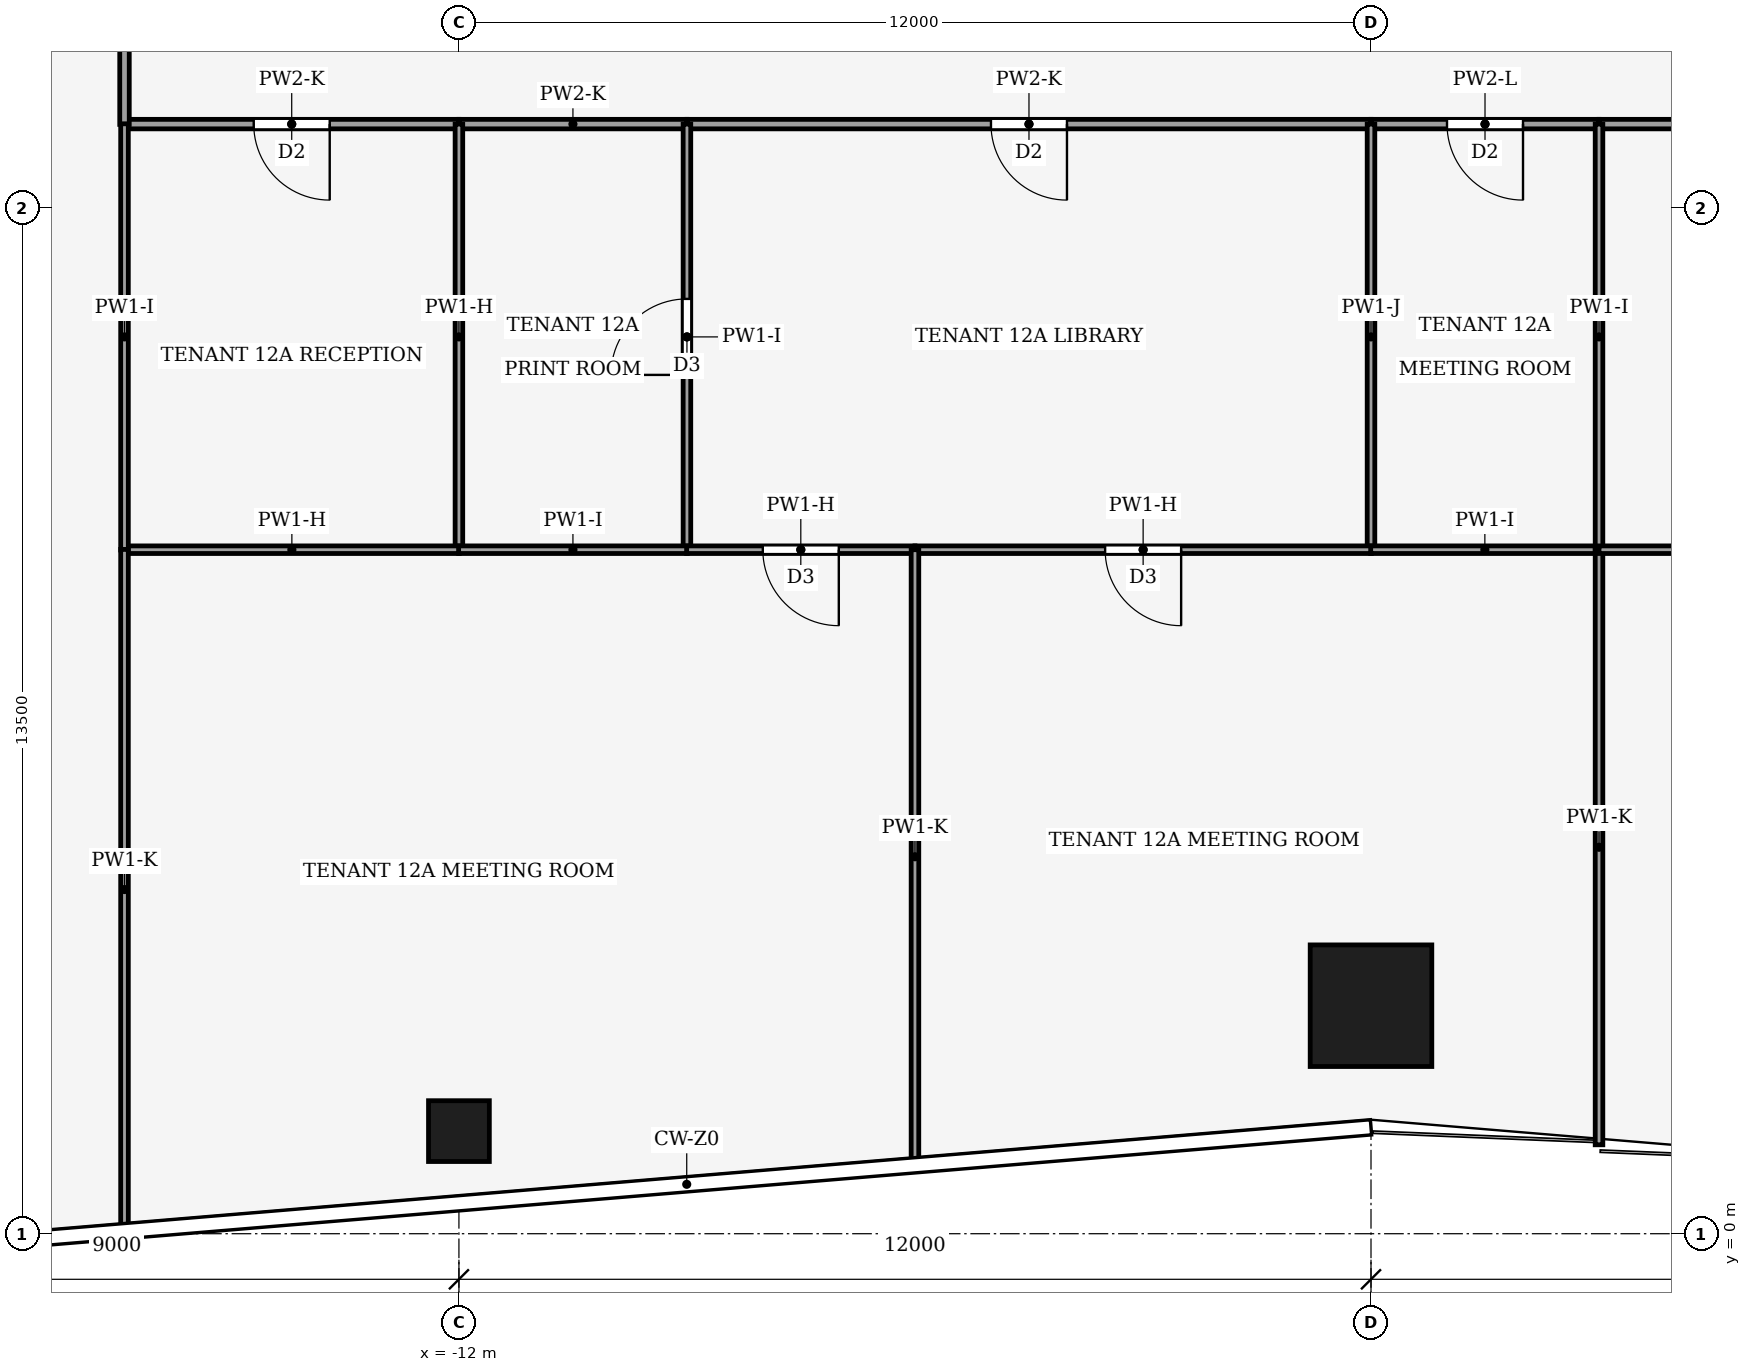
"""IFC4 building model, lengths in metres.
Left out: names, types, materials, properties, quantities, classifications, styles, units other than length and angle.
Written with IfcOpenShell. Run it as: python <this file> out.ifc"""

import sys

from ifc_helpers import new_model, si_unit, direction, frame, frame_2d, origin, origin_2d, place, context, subcontext, project, spatial, rectangle, hollow_rectangle, extrude, element, fill, save


model = new_model("IFC4")
c1 = context("Model", 3, precision=1e-05, world=origin(), true_north=direction((0.0, 1.0)))
c2 = subcontext(c1, "Body", "Model", "MODEL_VIEW")
j1 = project(units=[si_unit("LENGTHUNIT", "METRE"), si_unit("PLANEANGLEUNIT", "RADIAN")], contexts=[c1])
p1 = place(None, origin())
s1 = spatial("IfcSite", under=j1, at=p1, CompositionType="ELEMENT")
p2 = place(p1, origin())
s2 = spatial("IfcBuilding", under=s1, at=p2, CompositionType="ELEMENT")
p3 = place(p2, frame((0.0, 0.0, 54.0)))
s3 = spatial("IfcBuildingStorey", under=s2, at=p3, CompositionType="ELEMENT", Elevation=54.0)
p4 = place(p3, frame((0.0, 3.0, 0.0), z_axis=(0.0, 0.0, 1.0), x_axis=(1.0, 0.0, 0.0)))
e1 = element("IfcColumn", 1, at=p4, inside=s3, PredefinedType="COLUMN", context=c2, shape_type="SweptSolid", body=[
    extrude(hollow_rectangle(XDim=1.6, YDim=1.6, WallThickness=0.09, at=origin_2d()), origin(), (0.0, 0.0, 1.0), 4.0),
])
p5 = place(p3, frame((-12.0, 1.35, 0.0), z_axis=(0.0, 0.0, 1.0), x_axis=(1.0, 0.0, 0.0)))
e2 = element("IfcColumn", 2, at=p5, inside=s3, PredefinedType="COLUMN", context=c2, shape_type="SweptSolid", body=[
    extrude(hollow_rectangle(XDim=0.8, YDim=0.8, WallThickness=0.04, at=origin_2d()), origin(), (0.0, 0.0, 1.0), 4.0),
])
p6 = place(p3, frame((-12.0, 14.6, 0.0), z_axis=(0.0, 0.0, 1.0), x_axis=(-1.0, 0.0, 0.0)))
e3 = element("IfcWall", 3, at=p6, inside=s3, PredefinedType="PARTITIONING", context=c2, shape_type="SweptSolid", body=[
    extrude(rectangle(XDim=4.4, YDim=0.125, at=frame_2d((2.2, 0.0))), origin(), (0.0, 0.0, 1.0), 3.17),
])
p7 = place(p6, frame((1.7, 0.0, 0.0)))
e4 = element("IfcOpeningElement", 4, at=p7, cuts=e3, PredefinedType="OPENING", context=c2, shape_type="SweptSolid", body=[
    extrude(rectangle(XDim=1.0, YDim=2.1, at=frame_2d((0.5, 1.05))), frame((0.0, 0.073, 0.0), z_axis=(0.0, -1.0, 0.0), x_axis=(1.0, 0.0, 0.0)), (0.0, 0.0, 1.0), 0.145),
])
p8 = place(p3, frame((-12.0, 14.6, 0.0), z_axis=(0.0, 0.0, 1.0), x_axis=(1.0, 0.0, 0.0)))
e5 = element("IfcWall", 5, at=p8, inside=s3, PredefinedType="PARTITIONING", context=c2, shape_type="SweptSolid", body=[
    extrude(rectangle(XDim=3.0, YDim=0.125, at=frame_2d((1.5, 0.0))), origin(), (0.0, 0.0, 1.0), 3.17),
])
p9 = place(p3, frame((0.0, 14.6, 0.0), z_axis=(0.0, 0.0, 1.0), x_axis=(-1.0, 0.0, 0.0)))
e6 = element("IfcWall", 6, at=p9, inside=s3, PredefinedType="PARTITIONING", context=c2, shape_type="SweptSolid", body=[
    extrude(rectangle(XDim=9.0, YDim=0.125, at=frame_2d((4.5, 0.0))), origin(), (0.0, 0.0, 1.0), 3.17),
])
p10 = place(p9, frame((4.0, 0.0, 0.0)))
e7 = element("IfcOpeningElement", 7, at=p10, cuts=e6, PredefinedType="OPENING", context=c2, shape_type="SweptSolid", body=[
    extrude(rectangle(XDim=1.0, YDim=2.1, at=frame_2d((0.5, 1.05))), frame((0.0, 0.073, 0.0), z_axis=(0.0, -1.0, 0.0), x_axis=(1.0, 0.0, 0.0)), (0.0, 0.0, 1.0), 0.145),
])
p11 = place(p3, frame((3.0, 14.6, 0.0), z_axis=(0.0, 0.0, 1.0), x_axis=(-1.0, 0.0, 0.0)))
e8 = element("IfcWall", 8, at=p11, inside=s3, PredefinedType="PARTITIONING", context=c2, shape_type="SweptSolid", body=[
    extrude(rectangle(XDim=3.0, YDim=0.125, at=frame_2d((1.5, 0.0))), origin(), (0.0, 0.0, 1.0), 3.22),
])
p12 = place(p11, frame((1.0, 0.0, 0.0)))
e9 = element("IfcOpeningElement", 9, at=p12, cuts=e8, PredefinedType="OPENING", context=c2, shape_type="SweptSolid", body=[
    extrude(rectangle(XDim=1.0, YDim=2.1, at=frame_2d((0.5, 1.05))), frame((0.0, 0.073, 0.0), z_axis=(0.0, -1.0, 0.0), x_axis=(1.0, 0.0, 0.0)), (0.0, 0.0, 1.0), 0.145),
])
p13 = place(p3, frame((9.0, 14.6, 0.0), z_axis=(0.0, 0.0, 1.0), x_axis=(-1.0, 0.0, 0.0)))
e10 = element("IfcWall", 10, at=p13, inside=s3, PredefinedType="PARTITIONING", context=c2, shape_type="SweptSolid", body=[
    extrude(rectangle(XDim=6.0, YDim=0.125, at=frame_2d((3.0, 0.0))), origin(), (0.0, 0.0, 1.0), 3.17),
])
p14 = place(p13, frame((2.5, 0.0, 0.0)))
e11 = element("IfcOpeningElement", 11, at=p14, cuts=e10, PredefinedType="OPENING", context=c2, shape_type="SweptSolid", body=[
    extrude(rectangle(XDim=1.0, YDim=2.1, at=frame_2d((0.5, 1.05))), frame((0.0, 0.073, 0.0), z_axis=(0.0, -1.0, 0.0), x_axis=(1.0, 0.0, 0.0)), (0.0, 0.0, 1.0), 0.145),
])
p15 = place(p3, frame((-16.4, 14.596, 0.0), z_axis=(0.0, 0.0, 1.0), x_axis=(0.0, 1.0, 0.0)))
e12 = element("IfcWall", 12, at=p15, inside=s3, PredefinedType="PARTITIONING", context=c2, shape_type="SweptSolid", body=[
    extrude(rectangle(XDim=3.404, YDim=0.125, at=frame_2d((1.702, 0.0))), origin(), (0.0, 0.0, 1.0), 3.02),
])
p16 = place(p15, frame((1.602, 0.0, 0.0)))
e13 = element("IfcOpeningElement", 13, at=p16, cuts=e12, PredefinedType="OPENING", context=c2, shape_type="SweptSolid", body=[
    extrude(rectangle(XDim=1.0, YDim=2.1, at=frame_2d((0.5, 1.05))), frame((0.0, 0.073, 0.0), z_axis=(0.0, -1.0, 0.0), x_axis=(1.0, 0.0, 0.0)), (0.0, 0.0, 1.0), 0.145),
])
p17 = place(p3, frame((-12.0, 9.0, 0.0), z_axis=(0.0, 0.0, 1.0), x_axis=(0.0, 1.0, 0.0)))
e14 = element("IfcWall", 14, at=p17, inside=s3, PredefinedType="PARTITIONING", context=c2, shape_type="SweptSolid", body=[
    extrude(rectangle(XDim=5.6, YDim=0.1, at=frame_2d((2.8, 0.0))), origin(), (0.0, 0.0, 1.0), 3.17),
])
p18 = place(p3, frame((-16.4, 9.0, 0.0), z_axis=(0.0, 0.0, 1.0), x_axis=(1.0, 0.0, 0.0)))
e15 = element("IfcWall", 15, at=p18, inside=s3, PredefinedType="PARTITIONING", context=c2, shape_type="SweptSolid", body=[
    extrude(rectangle(XDim=4.404, YDim=0.1, at=frame_2d((2.202, 0.0))), origin(), (0.0, 0.0, 1.0), 3.17),
])
p19 = place(p3, frame((-16.4, 14.604, 0.0), z_axis=(0.0, 0.0, 1.0), x_axis=(0.0, -1.0, 0.0)))
e16 = element("IfcWall", 16, at=p19, inside=s3, PredefinedType="PARTITIONING", context=c2, shape_type="SweptSolid", body=[
    extrude(rectangle(XDim=5.608, YDim=0.1, at=frame_2d((2.804, 0.0))), origin(), (0.0, 0.0, 1.0), 3.75),
])
p20 = place(p3, frame((-9.0, 9.0, 0.0), z_axis=(0.0, 0.0, 1.0), x_axis=(0.0, 1.0, 0.0)))
e17 = element("IfcWall", 17, at=p20, inside=s3, PredefinedType="PARTITIONING", context=c2, shape_type="SweptSolid", body=[
    extrude(rectangle(XDim=5.6, YDim=0.1, at=frame_2d((2.8, 0.0))), origin(), (0.0, 0.0, 1.0), 3.75),
])
p21 = place(p20, frame((2.3, 0.0, 0.0)))
e18 = element("IfcOpeningElement", 18, at=p21, cuts=e17, PredefinedType="OPENING", context=c2, shape_type="SweptSolid", body=[
    extrude(rectangle(XDim=1.0, YDim=2.1, at=frame_2d((0.5, 1.05))), frame((0.0, 0.06, 0.0), z_axis=(0.0, -1.0, 0.0), x_axis=(1.0, 0.0, 0.0)), (0.0, 0.0, 1.0), 0.12),
])
p22 = place(p3, frame((-12.004, 9.0, 0.0), z_axis=(0.0, 0.0, 1.0), x_axis=(1.0, 0.0, 0.0)))
e19 = element("IfcWall", 19, at=p22, inside=s3, PredefinedType="PARTITIONING", context=c2, shape_type="SweptSolid", body=[
    extrude(rectangle(XDim=3.008, YDim=0.1, at=frame_2d((1.504, 0.0))), origin(), (0.0, 0.0, 1.0), 3.75),
])
p23 = place(p3, frame((0.0, 9.0, 0.0), z_axis=(0.0, 0.0, 1.0), x_axis=(0.0, 1.0, 0.0)))
e20 = element("IfcWall", 20, at=p23, inside=s3, PredefinedType="PARTITIONING", context=c2, shape_type="SweptSolid", body=[
    extrude(rectangle(XDim=5.6, YDim=0.1, at=frame_2d((2.8, 0.0))), origin(), (0.0, 0.0, 1.0), 3.22),
])
p24 = place(p3, frame((-6.0, 9.0, 0.0), z_axis=(0.0, 0.0, 1.0), x_axis=(-1.0, 0.0, 0.0)))
e21 = element("IfcWall", 21, at=p24, inside=s3, PredefinedType="PARTITIONING", context=c2, shape_type="SweptSolid", body=[
    extrude(rectangle(XDim=3.004, YDim=0.1, at=frame_2d((1.502, 0.0))), origin(), (0.0, 0.0, 1.0), 3.17),
])
p25 = place(p24, frame((1.002, 0.0, 0.0)))
e22 = element("IfcOpeningElement", 22, at=p25, cuts=e21, PredefinedType="OPENING", context=c2, shape_type="SweptSolid", body=[
    extrude(rectangle(XDim=1.0, YDim=2.1, at=frame_2d((0.5, 1.05))), frame((0.0, 0.06, 0.0), z_axis=(0.0, -1.0, 0.0), x_axis=(1.0, 0.0, 0.0)), (0.0, 0.0, 1.0), 0.12),
])
p26 = place(p3, frame((0.004, 9.0, 0.0), z_axis=(0.0, 0.0, 1.0), x_axis=(-1.0, 0.0, 0.0)))
e23 = element("IfcWall", 23, at=p26, inside=s3, PredefinedType="PARTITIONING", context=c2, shape_type="SweptSolid", body=[
    extrude(rectangle(XDim=6.004, YDim=0.1, at=frame_2d((3.002, 0.0))), origin(), (0.0, 0.0, 1.0), 3.17),
])
p27 = place(p26, frame((2.502, 0.0, 0.0)))
e24 = element("IfcOpeningElement", 24, at=p27, cuts=e23, PredefinedType="OPENING", context=c2, shape_type="SweptSolid", body=[
    extrude(rectangle(XDim=1.0, YDim=2.1, at=frame_2d((0.5, 1.05))), frame((0.0, 0.06, 0.0), z_axis=(0.0, -1.0, 0.0), x_axis=(1.0, 0.0, 0.0)), (0.0, 0.0, 1.0), 0.12),
])
p28 = place(p3, frame((-0.004, 9.0, 0.0), z_axis=(0.0, 0.0, 1.0), x_axis=(1.0, 0.0, 0.0)))
e25 = element("IfcWall", 25, at=p28, inside=s3, PredefinedType="PARTITIONING", context=c2, shape_type="SweptSolid", body=[
    extrude(rectangle(XDim=3.004, YDim=0.1, at=frame_2d((1.502, 0.0))), origin(), (0.0, 0.0, 1.0), 3.75),
])
p29 = place(p3, frame((3.0, 9.0, 0.0), z_axis=(0.0, 0.0, 1.0), x_axis=(0.0, 1.0, 0.0)))
e26 = element("IfcWall", 26, at=p29, inside=s3, PredefinedType="PARTITIONING", context=c2, shape_type="SweptSolid", body=[
    extrude(rectangle(XDim=5.6, YDim=0.1, at=frame_2d((2.8, 0.0))), origin(), (0.0, 0.0, 1.0), 3.75),
])
p30 = place(p3, frame((-6.0, 0.92, 0.0), z_axis=(0.0, 0.0, 1.0), x_axis=(0.0, 1.0, 0.0)))
e27 = element("IfcWall", 27, at=p30, inside=s3, PredefinedType="PARTITIONING", context=c2, shape_type="SweptSolid", body=[
    extrude(rectangle(XDim=8.08, YDim=0.1, at=frame_2d((4.04, 0.0))), origin(), (0.0, 0.0, 1.0), 2.92),
])
p31 = place(p3, frame((-16.4, 9.004, 0.0), z_axis=(0.0, 0.0, 1.0), x_axis=(0.0, -1.0, 0.0)))
e28 = element("IfcWall", 28, at=p31, inside=s3, PredefinedType="PARTITIONING", context=c2, shape_type="SweptSolid", body=[
    extrude(rectangle(XDim=8.951, YDim=0.1, at=frame_2d((4.475, 0.0))), origin(), (0.0, 0.0, 1.0), 2.92),
])
p32 = place(p3, frame((3.0, 1.17, 0.0), z_axis=(0.0, 0.0, 1.0), x_axis=(0.0, 1.0, 0.0)))
e29 = element("IfcWall", 29, at=p32, inside=s3, PredefinedType="PARTITIONING", context=c2, shape_type="SweptSolid", body=[
    extrude(rectangle(XDim=7.83, YDim=0.1, at=frame_2d((3.915, 0.0))), origin(), (0.0, 0.0, 1.0), 2.92),
])
p33 = place(p3, frame((9.004, 9.0, 0.0), z_axis=(0.0, 0.0, 1.0), x_axis=(-1.0, 0.0, 0.0)))
e30 = element("IfcWall", 30, at=p33, inside=s3, PredefinedType="PARTITIONING", context=c2, shape_type="SweptSolid", body=[
    extrude(rectangle(XDim=6.004, YDim=0.1, at=frame_2d((3.002, 0.0))), origin(), (0.0, 0.0, 1.0), 3.17),
])
p34 = place(p33, frame((2.502, 0.0, 0.0)))
e31 = element("IfcOpeningElement", 31, at=p34, cuts=e30, PredefinedType="OPENING", context=c2, shape_type="SweptSolid", body=[
    extrude(rectangle(XDim=1.0, YDim=2.1, at=frame_2d((0.5, 1.05))), frame((0.0, 0.06, 0.0), z_axis=(0.0, -1.0, 0.0), x_axis=(1.0, 0.0, 0.0)), (0.0, 0.0, 1.0), 0.12),
])
p35 = place(p7, origin())
e32 = element("IfcDoor", 32, at=p35, inside=s3, OperationType="SINGLE_SWING_LEFT", PredefinedType="DOOR", context=c2, shape_type="SweptSolid", body=[
    extrude(rectangle(XDim=1.0, YDim=2.1, at=frame_2d((0.5, 1.05))), frame((0.0, 0.025, 0.0), z_axis=(0.0, -1.0, 0.0), x_axis=(1.0, 0.0, 0.0)), (0.0, 0.0, 1.0), 0.05),
])
fill(e4, e32)
p36 = place(p10, origin())
e33 = element("IfcDoor", 33, at=p36, inside=s3, OperationType="SINGLE_SWING_RIGHT", PredefinedType="DOOR", context=c2, shape_type="SweptSolid", body=[
    extrude(rectangle(XDim=1.0, YDim=2.1, at=frame_2d((0.5, 1.05))), frame((0.0, 0.025, 0.0), z_axis=(0.0, -1.0, 0.0), x_axis=(1.0, 0.0, 0.0)), (0.0, 0.0, 1.0), 0.05),
])
fill(e7, e33)
p37 = place(p12, origin())
e34 = element("IfcDoor", 34, at=p37, inside=s3, OperationType="SINGLE_SWING_LEFT", PredefinedType="DOOR", context=c2, shape_type="SweptSolid", body=[
    extrude(rectangle(XDim=1.0, YDim=2.1, at=frame_2d((0.5, 1.05))), frame((0.0, 0.025, 0.0), z_axis=(0.0, -1.0, 0.0), x_axis=(1.0, 0.0, 0.0)), (0.0, 0.0, 1.0), 0.05),
])
fill(e9, e34)
p38 = place(p21, origin())
e35 = element("IfcDoor", 35, at=p38, inside=s3, OperationType="SINGLE_SWING_LEFT", PredefinedType="DOOR", context=c2, shape_type="SweptSolid", body=[
    extrude(rectangle(XDim=1.0, YDim=2.1, at=frame_2d((0.5, 1.05))), frame((0.0, 0.025, 0.0), z_axis=(0.0, -1.0, 0.0), x_axis=(1.0, 0.0, 0.0)), (0.0, 0.0, 1.0), 0.05),
])
fill(e18, e35)
p39 = place(p25, origin())
e36 = element("IfcDoor", 36, at=p39, inside=s3, OperationType="SINGLE_SWING_RIGHT", PredefinedType="DOOR", context=c2, shape_type="SweptSolid", body=[
    extrude(rectangle(XDim=1.0, YDim=2.1, at=frame_2d((0.5, 1.05))), frame((0.0, 0.025, 0.0), z_axis=(0.0, -1.0, 0.0), x_axis=(1.0, 0.0, 0.0)), (0.0, 0.0, 1.0), 0.05),
])
fill(e22, e36)
p40 = place(p27, origin())
e37 = element("IfcDoor", 37, at=p40, inside=s3, OperationType="SINGLE_SWING_LEFT", PredefinedType="DOOR", context=c2, shape_type="SweptSolid", body=[
    extrude(rectangle(XDim=1.0, YDim=2.1, at=frame_2d((0.5, 1.05))), frame((0.0, 0.025, 0.0), z_axis=(0.0, -1.0, 0.0), x_axis=(1.0, 0.0, 0.0)), (0.0, 0.0, 1.0), 0.05),
])
fill(e24, e37)
save(model, sys.argv[1])
